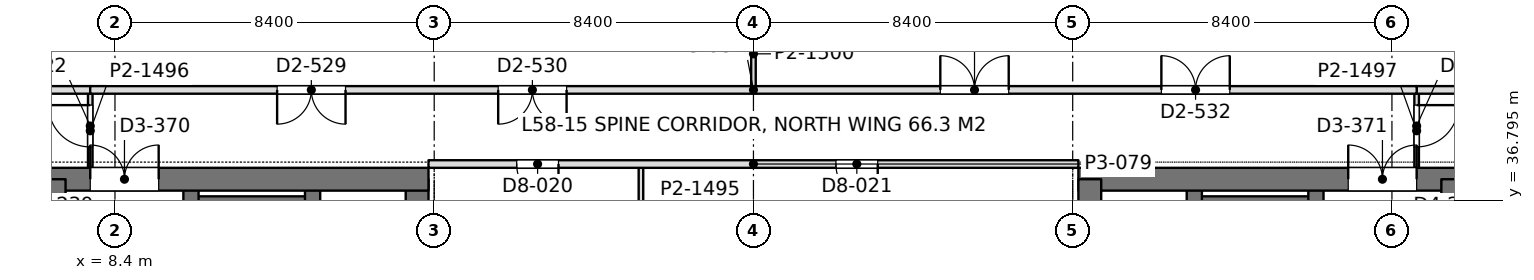
"""IFC4 building model, lengths in metres.
Left out: names, types, materials, properties, quantities, classifications, styles, units other than length and angle.
Written with IfcOpenShell. Run it as: python <this file> out.ifc"""

import sys

from ifc_helpers import new_model, si_unit, direction, frame, frame_2d, origin, place, context, subcontext, project, spatial, rectangle, extrude, element, fill, save


model = new_model("IFC4")
c1 = context("Model", 3, precision=1e-05, world=origin(), true_north=direction((0.0, 1.0)))
c2 = subcontext(c1, "Body", "Model", "MODEL_VIEW")
j1 = project(units=[si_unit("LENGTHUNIT", "METRE"), si_unit("PLANEANGLEUNIT", "RADIAN")], contexts=[c1])
p1 = place(None, origin())
s1 = spatial("IfcSite", under=j1, at=p1, CompositionType="ELEMENT")
p2 = place(p1, origin())
s2 = spatial("IfcBuilding", under=s1, at=p2, CompositionType="ELEMENT")
p3 = place(p2, frame((0.0, 0.0, 254.7)))
s3 = spatial("IfcBuildingStorey", under=s2, at=p3, CompositionType="ELEMENT", Elevation=254.7)
p4 = place(p3, frame((-1.05, 37.35, 0.0), z_axis=(0.0, 0.0, 1.0), x_axis=(1.0, 0.0, 0.0)))
e1 = element("IfcWall", 1, at=p4, inside=s3, PredefinedType="SHEAR", context=c2, shape_type="SweptSolid", body=[
    extrude(rectangle(XDim=17.7, YDim=0.6, at=frame_2d((8.85, 0.0))), origin(), (0.0, 0.0, 1.0), 4.5),
])
p5 = place(p4, frame((8.8, 0.0, 0.0)))
e2 = element("IfcOpeningElement", 2, at=p5, cuts=e1, PredefinedType="OPENING", context=c2, shape_type="SweptSolid", body=[
    extrude(rectangle(XDim=1.8, YDim=2.4, at=frame_2d((0.9, 1.2))), frame((0.0, 0.31, 0.0), z_axis=(0.0, -1.0, 0.0), x_axis=(1.0, 0.0, 0.0)), (0.0, 0.0, 1.0), 0.62),
])
p6 = place(p3, frame((16.35, 27.8, 0.0), z_axis=(0.0, 0.0, 1.0), x_axis=(0.0, 1.0, 0.0)))
e3 = element("IfcWall", 3, at=p6, inside=s3, PredefinedType="SHEAR", context=c2, shape_type="SweptSolid", body=[
    extrude(rectangle(XDim=9.55, YDim=0.6, at=frame_2d((4.775, 0.0))), origin(), (0.0, 0.0, 1.0), 4.5),
])
p7 = place(p3, frame((6.9, 13.05, 0.0), z_axis=(0.0, 0.0, 1.0), x_axis=(0.0, 1.0, 0.0)))
e4 = element("IfcWall", 4, at=p7, inside=s3, PredefinedType="SHEAR", context=c2, shape_type="SweptSolid", body=[
    extrude(rectangle(XDim=24.3, YDim=0.4, at=frame_2d((12.15, 0.0))), origin(), (0.0, 0.0, 1.0), 4.5),
])
p8 = place(p7, frame((1.3, 0.0, 0.0)))
e5 = element("IfcOpeningElement", 5, at=p8, cuts=e4, PredefinedType="OPENING", context=c2, shape_type="SweptSolid", body=[
    extrude(rectangle(XDim=1.0, YDim=2.2, at=frame_2d((0.5, 1.1))), frame((0.0, 0.21, 0.0), z_axis=(0.0, -1.0, 0.0), x_axis=(1.0, 0.0, 0.0)), (0.0, 0.0, 1.0), 0.42),
])
p9 = place(p7, frame((22.0, 0.0, 0.0)))
e6 = element("IfcOpeningElement", 6, at=p9, cuts=e4, PredefinedType="OPENING", context=c2, shape_type="SweptSolid", body=[
    extrude(rectangle(XDim=1.0, YDim=2.2, at=frame_2d((0.5, 1.1))), frame((0.0, 0.21, 0.0), z_axis=(0.0, -1.0, 0.0), x_axis=(1.0, 0.0, 0.0)), (0.0, 0.0, 1.0), 0.42),
])
p10 = place(p7, frame((5.55, 0.0, 0.0)))
e7 = element("IfcOpeningElement", 7, at=p10, cuts=e4, PredefinedType="OPENING", context=c2, shape_type="SweptSolid", body=[
    extrude(rectangle(XDim=1.0, YDim=2.2, at=frame_2d((0.5, 1.1))), frame((0.0, 0.21, 0.0), z_axis=(0.0, -1.0, 0.0), x_axis=(1.0, 0.0, 0.0)), (0.0, 0.0, 1.0), 0.42),
])
p11 = place(p7, frame((9.55, 0.0, 0.0)))
e8 = element("IfcOpeningElement", 8, at=p11, cuts=e4, PredefinedType="OPENING", context=c2, shape_type="SweptSolid", body=[
    extrude(rectangle(XDim=1.0, YDim=2.2, at=frame_2d((0.5, 1.1))), frame((0.0, 0.21, 0.0), z_axis=(0.0, -1.0, 0.0), x_axis=(1.0, 0.0, 0.0)), (0.0, 0.0, 1.0), 0.42),
])
p12 = place(p7, frame((12.8, 0.0, 0.0)))
e9 = element("IfcOpeningElement", 9, at=p12, cuts=e4, PredefinedType="OPENING", context=c2, shape_type="SweptSolid", body=[
    extrude(rectangle(XDim=1.1, YDim=2.2, at=frame_2d((0.55, 1.1))), frame((0.0, 0.21, 0.0), z_axis=(0.0, -1.0, 0.0), x_axis=(1.0, 0.0, 0.0)), (0.0, 0.0, 1.0), 0.42),
])
p13 = place(p7, frame((15.538, 0.0, 0.0)))
e10 = element("IfcOpeningElement", 10, at=p13, cuts=e4, PredefinedType="OPENING", context=c2, shape_type="SweptSolid", body=[
    extrude(rectangle(XDim=1.1, YDim=2.2, at=frame_2d((0.55, 1.1))), frame((0.0, 0.21, 0.0), z_axis=(0.0, -1.0, 0.0), x_axis=(1.0, 0.0, 0.0)), (0.0, 0.0, 1.0), 0.42),
])
p14 = place(p7, frame((18.262, 0.0, 0.0)))
e11 = element("IfcOpeningElement", 11, at=p14, cuts=e4, PredefinedType="OPENING", context=c2, shape_type="SweptSolid", body=[
    extrude(rectangle(XDim=1.1, YDim=2.2, at=frame_2d((0.55, 1.1))), frame((0.0, 0.21, 0.0), z_axis=(0.0, -1.0, 0.0), x_axis=(1.0, 0.0, 0.0)), (0.0, 0.0, 1.0), 0.42),
])
p15 = place(p3, frame((10.4, 13.05, 0.0), z_axis=(0.0, 0.0, 1.0), x_axis=(0.0, 1.0, 0.0)))
e12 = element("IfcWall", 12, at=p15, inside=s3, PredefinedType="SHEAR", context=c2, shape_type="SweptSolid", body=[
    extrude(rectangle(XDim=24.3, YDim=0.4, at=frame_2d((12.15, 0.0))), origin(), (0.0, 0.0, 1.0), 4.5),
])
p16 = place(p15, frame((15.75, 0.0, 0.0)))
e13 = element("IfcOpeningElement", 13, at=p16, cuts=e12, PredefinedType="OPENING", context=c2, shape_type="SweptSolid", body=[
    extrude(rectangle(XDim=1.1, YDim=2.2, at=frame_2d((0.55, 1.1))), frame((0.0, 0.21, 0.0), z_axis=(0.0, -1.0, 0.0), x_axis=(1.0, 0.0, 0.0)), (0.0, 0.0, 1.0), 0.42),
])
p17 = place(p15, frame((18.6, 0.0, 0.0)))
e14 = element("IfcOpeningElement", 14, at=p17, cuts=e12, PredefinedType="OPENING", context=c2, shape_type="SweptSolid", body=[
    extrude(rectangle(XDim=1.1, YDim=2.2, at=frame_2d((0.55, 1.1))), frame((0.0, 0.21, 0.0), z_axis=(0.0, -1.0, 0.0), x_axis=(1.0, 0.0, 0.0)), (0.0, 0.0, 1.0), 0.42),
])
p18 = place(p15, frame((21.45, 0.0, 0.0)))
e15 = element("IfcOpeningElement", 15, at=p18, cuts=e12, PredefinedType="OPENING", context=c2, shape_type="SweptSolid", body=[
    extrude(rectangle(XDim=1.1, YDim=2.2, at=frame_2d((0.55, 1.1))), frame((0.0, 0.21, 0.0), z_axis=(0.0, -1.0, 0.0), x_axis=(1.0, 0.0, 0.0)), (0.0, 0.0, 1.0), 0.42),
])
p19 = place(p15, frame((8.65, 0.0, 0.0)))
e16 = element("IfcOpeningElement", 16, at=p19, cuts=e12, PredefinedType="OPENING", context=c2, shape_type="SweptSolid", body=[
    extrude(rectangle(XDim=1.8, YDim=2.4, at=frame_2d((0.9, 1.2))), frame((0.0, 0.21, 0.0), z_axis=(0.0, -1.0, 0.0), x_axis=(1.0, 0.0, 0.0)), (0.0, 0.0, 1.0), 0.42),
])
p20 = place(p3, frame((13.6, 27.925, 0.0), z_axis=(0.0, 0.0, 1.0), x_axis=(0.0, 1.0, 0.0)))
e17 = element("IfcWall", 17, at=p20, inside=s3, PredefinedType="SHEAR", context=c2, shape_type="SweptSolid", body=[
    extrude(rectangle(XDim=9.425, YDim=0.4, at=frame_2d((4.712, 0.0))), origin(), (0.0, 0.0, 1.0), 4.5),
])
p21 = place(p3, frame((10.4, 36.625, 0.0), z_axis=(0.0, 0.0, 1.0), x_axis=(1.0, 0.0, 0.0)))
e18 = element("IfcWall", 18, at=p21, inside=s3, PredefinedType="SHEAR", context=c2, shape_type="SweptSolid", body=[
    extrude(rectangle(XDim=3.2, YDim=0.55, at=frame_2d((1.6, 0.0))), origin(), (0.0, 0.0, 1.0), 4.5),
])
p22 = place(p3, frame((33.75, 37.35, 0.0), z_axis=(0.0, 0.0, 1.0), x_axis=(1.0, 0.0, 0.0)))
e19 = element("IfcWall", 19, at=p22, inside=s3, PredefinedType="SHEAR", context=c2, shape_type="SweptSolid", body=[
    extrude(rectangle(XDim=17.7, YDim=0.6, at=frame_2d((8.85, 0.0))), origin(), (0.0, 0.0, 1.0), 4.5),
])
p23 = place(p22, frame((7.1, 0.0, 0.0)))
e20 = element("IfcOpeningElement", 20, at=p23, cuts=e19, PredefinedType="OPENING", context=c2, shape_type="SweptSolid", body=[
    extrude(rectangle(XDim=1.8, YDim=2.4, at=frame_2d((0.9, 1.2))), frame((0.0, 0.31, 0.0), z_axis=(0.0, -1.0, 0.0), x_axis=(1.0, 0.0, 0.0)), (0.0, 0.0, 1.0), 0.62),
])
p24 = place(p3, frame((34.05, 27.8, 0.0), z_axis=(0.0, 0.0, 1.0), x_axis=(0.0, 1.0, 0.0)))
e21 = element("IfcWall", 21, at=p24, inside=s3, PredefinedType="SHEAR", context=c2, shape_type="SweptSolid", body=[
    extrude(rectangle(XDim=9.55, YDim=0.6, at=frame_2d((4.775, 0.0))), origin(), (0.0, 0.0, 1.0), 4.5),
])
p25 = place(p3, frame((43.5, 13.05, 0.0), z_axis=(0.0, 0.0, 1.0), x_axis=(0.0, 1.0, 0.0)))
e22 = element("IfcWall", 22, at=p25, inside=s3, PredefinedType="SHEAR", context=c2, shape_type="SweptSolid", body=[
    extrude(rectangle(XDim=24.3, YDim=0.4, at=frame_2d((12.15, 0.0))), origin(), (0.0, 0.0, 1.0), 4.5),
])
p26 = place(p25, frame((1.3, 0.0, 0.0)))
e23 = element("IfcOpeningElement", 23, at=p26, cuts=e22, PredefinedType="OPENING", context=c2, shape_type="SweptSolid", body=[
    extrude(rectangle(XDim=1.0, YDim=2.2, at=frame_2d((0.5, 1.1))), frame((0.0, 0.21, 0.0), z_axis=(0.0, -1.0, 0.0), x_axis=(1.0, 0.0, 0.0)), (0.0, 0.0, 1.0), 0.42),
])
p27 = place(p25, frame((22.0, 0.0, 0.0)))
e24 = element("IfcOpeningElement", 24, at=p27, cuts=e22, PredefinedType="OPENING", context=c2, shape_type="SweptSolid", body=[
    extrude(rectangle(XDim=1.0, YDim=2.2, at=frame_2d((0.5, 1.1))), frame((0.0, 0.21, 0.0), z_axis=(0.0, -1.0, 0.0), x_axis=(1.0, 0.0, 0.0)), (0.0, 0.0, 1.0), 0.42),
])
p28 = place(p25, frame((5.55, 0.0, 0.0)))
e25 = element("IfcOpeningElement", 25, at=p28, cuts=e22, PredefinedType="OPENING", context=c2, shape_type="SweptSolid", body=[
    extrude(rectangle(XDim=1.0, YDim=2.2, at=frame_2d((0.5, 1.1))), frame((0.0, 0.21, 0.0), z_axis=(0.0, -1.0, 0.0), x_axis=(1.0, 0.0, 0.0)), (0.0, 0.0, 1.0), 0.42),
])
p29 = place(p25, frame((9.55, 0.0, 0.0)))
e26 = element("IfcOpeningElement", 26, at=p29, cuts=e22, PredefinedType="OPENING", context=c2, shape_type="SweptSolid", body=[
    extrude(rectangle(XDim=1.0, YDim=2.2, at=frame_2d((0.5, 1.1))), frame((0.0, 0.21, 0.0), z_axis=(0.0, -1.0, 0.0), x_axis=(1.0, 0.0, 0.0)), (0.0, 0.0, 1.0), 0.42),
])
p30 = place(p25, frame((12.8, 0.0, 0.0)))
e27 = element("IfcOpeningElement", 27, at=p30, cuts=e22, PredefinedType="OPENING", context=c2, shape_type="SweptSolid", body=[
    extrude(rectangle(XDim=1.1, YDim=2.2, at=frame_2d((0.55, 1.1))), frame((0.0, 0.21, 0.0), z_axis=(0.0, -1.0, 0.0), x_axis=(1.0, 0.0, 0.0)), (0.0, 0.0, 1.0), 0.42),
])
p31 = place(p25, frame((15.538, 0.0, 0.0)))
e28 = element("IfcOpeningElement", 28, at=p31, cuts=e22, PredefinedType="OPENING", context=c2, shape_type="SweptSolid", body=[
    extrude(rectangle(XDim=1.1, YDim=2.2, at=frame_2d((0.55, 1.1))), frame((0.0, 0.21, 0.0), z_axis=(0.0, -1.0, 0.0), x_axis=(1.0, 0.0, 0.0)), (0.0, 0.0, 1.0), 0.42),
])
p32 = place(p25, frame((18.262, 0.0, 0.0)))
e29 = element("IfcOpeningElement", 29, at=p32, cuts=e22, PredefinedType="OPENING", context=c2, shape_type="SweptSolid", body=[
    extrude(rectangle(XDim=1.1, YDim=2.2, at=frame_2d((0.55, 1.1))), frame((0.0, 0.21, 0.0), z_axis=(0.0, -1.0, 0.0), x_axis=(1.0, 0.0, 0.0)), (0.0, 0.0, 1.0), 0.42),
])
p33 = place(p3, frame((40.0, 13.05, 0.0), z_axis=(0.0, 0.0, 1.0), x_axis=(0.0, 1.0, 0.0)))
e30 = element("IfcWall", 30, at=p33, inside=s3, PredefinedType="SHEAR", context=c2, shape_type="SweptSolid", body=[
    extrude(rectangle(XDim=24.3, YDim=0.4, at=frame_2d((12.15, 0.0))), origin(), (0.0, 0.0, 1.0), 4.5),
])
p34 = place(p33, frame((15.75, 0.0, 0.0)))
e31 = element("IfcOpeningElement", 31, at=p34, cuts=e30, PredefinedType="OPENING", context=c2, shape_type="SweptSolid", body=[
    extrude(rectangle(XDim=1.1, YDim=2.2, at=frame_2d((0.55, 1.1))), frame((0.0, 0.21, 0.0), z_axis=(0.0, -1.0, 0.0), x_axis=(1.0, 0.0, 0.0)), (0.0, 0.0, 1.0), 0.42),
])
p35 = place(p33, frame((18.6, 0.0, 0.0)))
e32 = element("IfcOpeningElement", 32, at=p35, cuts=e30, PredefinedType="OPENING", context=c2, shape_type="SweptSolid", body=[
    extrude(rectangle(XDim=1.1, YDim=2.2, at=frame_2d((0.55, 1.1))), frame((0.0, 0.21, 0.0), z_axis=(0.0, -1.0, 0.0), x_axis=(1.0, 0.0, 0.0)), (0.0, 0.0, 1.0), 0.42),
])
p36 = place(p33, frame((21.45, 0.0, 0.0)))
e33 = element("IfcOpeningElement", 33, at=p36, cuts=e30, PredefinedType="OPENING", context=c2, shape_type="SweptSolid", body=[
    extrude(rectangle(XDim=1.1, YDim=2.2, at=frame_2d((0.55, 1.1))), frame((0.0, 0.21, 0.0), z_axis=(0.0, -1.0, 0.0), x_axis=(1.0, 0.0, 0.0)), (0.0, 0.0, 1.0), 0.42),
])
p37 = place(p33, frame((8.65, 0.0, 0.0)))
e34 = element("IfcOpeningElement", 34, at=p37, cuts=e30, PredefinedType="OPENING", context=c2, shape_type="SweptSolid", body=[
    extrude(rectangle(XDim=1.8, YDim=2.4, at=frame_2d((0.9, 1.2))), frame((0.0, 0.21, 0.0), z_axis=(0.0, -1.0, 0.0), x_axis=(1.0, 0.0, 0.0)), (0.0, 0.0, 1.0), 0.42),
])
p38 = place(p33, frame((1.5, 0.0, 0.0)))
e35 = element("IfcOpeningElement", 35, at=p38, cuts=e30, PredefinedType="OPENING", context=c2, shape_type="SweptSolid", body=[
    extrude(rectangle(XDim=1.8, YDim=2.4, at=frame_2d((0.9, 1.2))), frame((0.0, 0.21, 0.0), z_axis=(0.0, -1.0, 0.0), x_axis=(1.0, 0.0, 0.0)), (0.0, 0.0, 1.0), 0.42),
])
p39 = place(p3, frame((36.8, 27.925, 0.0), z_axis=(0.0, 0.0, 1.0), x_axis=(0.0, 1.0, 0.0)))
e36 = element("IfcWall", 36, at=p39, inside=s3, PredefinedType="SHEAR", context=c2, shape_type="SweptSolid", body=[
    extrude(rectangle(XDim=9.425, YDim=0.4, at=frame_2d((4.712, 0.0))), origin(), (0.0, 0.0, 1.0), 4.5),
])
p40 = place(p3, frame((40.0, 36.625, 0.0), z_axis=(0.0, 0.0, 1.0), x_axis=(-1.0, 0.0, 0.0)))
e37 = element("IfcWall", 37, at=p40, inside=s3, PredefinedType="SHEAR", context=c2, shape_type="SweptSolid", body=[
    extrude(rectangle(XDim=3.2, YDim=0.55, at=frame_2d((1.6, 0.0))), origin(), (0.0, 0.0, 1.0), 4.5),
])
p41 = place(p3, frame((25.2, 39.798, 0.0), z_axis=(0.0, 0.0, 1.0), x_axis=(0.0, 1.0, 0.0)))
e38 = element("IfcWall", 38, at=p41, inside=s3, PredefinedType="PARTITIONING", context=c2, shape_type="SweptSolid", body=[
    extrude(rectangle(XDim=1.703, YDim=0.12, at=frame_2d((0.852, 0.0))), origin(), (0.0, 0.0, 1.0), 3.8),
])
p42 = place(p3, frame((7.748, 39.7, 0.0), z_axis=(0.0, 0.0, 1.0), x_axis=(1.0, 0.0, 0.0)))
e39 = element("IfcWall", 39, at=p42, inside=s3, PredefinedType="PARTITIONING", context=c2, shape_type="SweptSolid", body=[
    extrude(rectangle(XDim=34.904, YDim=0.2, at=frame_2d((17.452, 0.0))), origin(), (0.0, 0.0, 1.0), 3.8),
])
p43 = place(p42, frame((4.919, 0.0, 0.0)))
e40 = element("IfcOpeningElement", 40, at=p43, cuts=e39, PredefinedType="OPENING", context=c2, shape_type="SweptSolid", body=[
    extrude(rectangle(XDim=1.8, YDim=2.2, at=frame_2d((0.9, 1.1))), frame((0.0, 0.11, 0.0), z_axis=(0.0, -1.0, 0.0), x_axis=(1.0, 0.0, 0.0)), (0.0, 0.0, 1.0), 0.22),
])
p44 = place(p42, frame((10.735, 0.0, 0.0)))
e41 = element("IfcOpeningElement", 41, at=p44, cuts=e39, PredefinedType="OPENING", context=c2, shape_type="SweptSolid", body=[
    extrude(rectangle(XDim=1.8, YDim=2.2, at=frame_2d((0.9, 1.1))), frame((0.0, 0.11, 0.0), z_axis=(0.0, -1.0, 0.0), x_axis=(1.0, 0.0, 0.0)), (0.0, 0.0, 1.0), 0.22),
])
p45 = place(p42, frame((22.369, 0.0, 0.0)))
e42 = element("IfcOpeningElement", 42, at=p45, cuts=e39, PredefinedType="OPENING", context=c2, shape_type="SweptSolid", body=[
    extrude(rectangle(XDim=1.8, YDim=2.2, at=frame_2d((0.9, 1.1))), frame((0.0, 0.11, 0.0), z_axis=(0.0, -1.0, 0.0), x_axis=(1.0, 0.0, 0.0)), (0.0, 0.0, 1.0), 0.22),
])
p46 = place(p42, frame((28.185, 0.0, 0.0)))
e43 = element("IfcOpeningElement", 43, at=p46, cuts=e39, PredefinedType="OPENING", context=c2, shape_type="SweptSolid", body=[
    extrude(rectangle(XDim=1.8, YDim=2.2, at=frame_2d((0.9, 1.1))), frame((0.0, 0.11, 0.0), z_axis=(0.0, -1.0, 0.0), x_axis=(1.0, 0.0, 0.0)), (0.0, 0.0, 1.0), 0.22),
])
p47 = place(p3, frame((7.75, 37.648, 0.0), z_axis=(0.0, 0.0, 1.0), x_axis=(0.0, 1.0, 0.0)))
e44 = element("IfcWall", 44, at=p47, inside=s3, PredefinedType="PARTITIONING", context=c2, shape_type="SweptSolid", body=[
    extrude(rectangle(XDim=1.954, YDim=0.12, at=frame_2d((0.977, 0.0))), origin(), (0.0, 0.0, 1.0), 4.35),
])
p48 = place(p47, frame((0.552, 0.0, 0.0)))
e45 = element("IfcOpeningElement", 45, at=p48, cuts=e44, PredefinedType="OPENING", context=c2, shape_type="SweptSolid", body=[
    extrude(rectangle(XDim=1.1, YDim=2.4, at=frame_2d((0.55, 1.2))), frame((0.0, 0.07, 0.0), z_axis=(0.0, -1.0, 0.0), x_axis=(1.0, 0.0, 0.0)), (0.0, 0.0, 1.0), 0.14),
])
p49 = place(p3, frame((42.65, 37.648, 0.0), z_axis=(0.0, 0.0, 1.0), x_axis=(0.0, 1.0, 0.0)))
e46 = element("IfcWall", 46, at=p49, inside=s3, PredefinedType="PARTITIONING", context=c2, shape_type="SweptSolid", body=[
    extrude(rectangle(XDim=1.954, YDim=0.12, at=frame_2d((0.977, 0.0))), origin(), (0.0, 0.0, 1.0), 4.35),
])
p50 = place(p49, frame((0.552, 0.0, 0.0)))
e47 = element("IfcOpeningElement", 47, at=p50, cuts=e46, PredefinedType="OPENING", context=c2, shape_type="SweptSolid", body=[
    extrude(rectangle(XDim=1.1, YDim=2.4, at=frame_2d((0.55, 1.2))), frame((0.0, 0.07, 0.0), z_axis=(0.0, -1.0, 0.0), x_axis=(1.0, 0.0, 0.0)), (0.0, 0.0, 1.0), 0.14),
])
for number, where, z_axis, x_axis in (
    (48, (1.2, 39.7, 0.0), (0.0, 0.0, 1.0), (1.0, 0.0, 0.0)),
    (49, (42.648, 39.7, 0.0), (0.0, 0.0, 1.0), (1.0, 0.0, 0.0)),
):
    element("IfcWall", number, at=place(p3, frame(where, z_axis=z_axis, x_axis=x_axis)), inside=s3, PredefinedType="PARTITIONING", context=c2, shape_type="SweptSolid", body=[
        extrude(rectangle(XDim=6.552, YDim=0.2, at=frame_2d((3.276, 0.0))), origin(), (0.0, 0.0, 1.0), 3.99),
    ])
p51 = place(p3, frame((22.24, 33.298, 0.0), z_axis=(0.0, 0.0, 1.0), x_axis=(0.0, 1.0, 0.0)))
e50 = element("IfcWall", 50, at=p51, inside=s3, PredefinedType="PARTITIONING", context=c2, shape_type="SweptSolid", body=[
    extrude(rectangle(XDim=4.404, YDim=0.12, at=frame_2d((2.202, 0.0))), origin(), (0.0, 0.0, 1.0), 3.66),
])
p52 = place(p3, frame((16.65, 37.75, 0.0), z_axis=(0.0, 0.0, 1.0), x_axis=(1.0, 0.0, 0.0)))
e51 = element("IfcWall", 51, at=p52, inside=s3, PredefinedType="PARTITIONING", context=c2, shape_type="SweptSolid", body=[
    extrude(rectangle(XDim=17.1, YDim=0.2, at=frame_2d((8.55, 0.0))), origin(), (0.0, 0.0, 1.0), 3.8),
])
p53 = place(p52, frame((2.32, 0.0, 0.0)))
e52 = element("IfcOpeningElement", 52, at=p53, cuts=e51, PredefinedType="OPENING", context=c2, shape_type="SweptSolid", body=[
    extrude(rectangle(XDim=1.1, YDim=2.4, at=frame_2d((0.55, 1.2))), frame((0.0, 0.11, 0.0), z_axis=(0.0, -1.0, 0.0), x_axis=(1.0, 0.0, 0.0)), (0.0, 0.0, 1.0), 0.22),
])
p54 = place(p52, frame((10.72, 0.0, 0.0)))
e53 = element("IfcOpeningElement", 53, at=p54, cuts=e51, PredefinedType="OPENING", context=c2, shape_type="SweptSolid", body=[
    extrude(rectangle(XDim=1.1, YDim=2.4, at=frame_2d((0.55, 1.2))), frame((0.0, 0.11, 0.0), z_axis=(0.0, -1.0, 0.0), x_axis=(1.0, 0.0, 0.0)), (0.0, 0.0, 1.0), 0.22),
])
p55 = place(p5, origin())
e54 = element("IfcDoor", 54, at=p55, inside=s3, OperationType="DOUBLE_DOOR_SINGLE_SWING", PredefinedType="DOOR", context=c2, shape_type="SweptSolid", body=[
    extrude(rectangle(XDim=1.8, YDim=2.4, at=frame_2d((0.9, 1.2))), frame((0.0, 0.025, 0.0), z_axis=(0.0, -1.0, 0.0), x_axis=(1.0, 0.0, 0.0)), (0.0, 0.0, 1.0), 0.05),
])
fill(e2, e54)
p56 = place(p23, origin())
e55 = element("IfcDoor", 55, at=p56, inside=s3, OperationType="DOUBLE_DOOR_SINGLE_SWING", PredefinedType="DOOR", context=c2, shape_type="SweptSolid", body=[
    extrude(rectangle(XDim=1.8, YDim=2.4, at=frame_2d((0.9, 1.2))), frame((0.0, 0.025, 0.0), z_axis=(0.0, -1.0, 0.0), x_axis=(1.0, 0.0, 0.0)), (0.0, 0.0, 1.0), 0.05),
])
fill(e20, e55)
p57 = place(p43, frame((1.8, 0.0, 0.0), z_axis=(0.0, 0.0, 1.0), x_axis=(-1.0, 0.0, 0.0)))
e56 = element("IfcDoor", 56, at=p57, inside=s3, OperationType="DOUBLE_DOOR_SINGLE_SWING", PredefinedType="DOOR", context=c2, shape_type="SweptSolid", body=[
    extrude(rectangle(XDim=1.8, YDim=2.2, at=frame_2d((0.9, 1.1))), frame((0.0, 0.025, 0.0), z_axis=(0.0, -1.0, 0.0), x_axis=(1.0, 0.0, 0.0)), (0.0, 0.0, 1.0), 0.05),
])
fill(e40, e56)
p58 = place(p44, frame((1.8, 0.0, 0.0), z_axis=(0.0, 0.0, 1.0), x_axis=(-1.0, 0.0, 0.0)))
e57 = element("IfcDoor", 57, at=p58, inside=s3, OperationType="DOUBLE_DOOR_SINGLE_SWING", PredefinedType="DOOR", context=c2, shape_type="SweptSolid", body=[
    extrude(rectangle(XDim=1.8, YDim=2.2, at=frame_2d((0.9, 1.1))), frame((0.0, 0.025, 0.0), z_axis=(0.0, -1.0, 0.0), x_axis=(1.0, 0.0, 0.0)), (0.0, 0.0, 1.0), 0.05),
])
fill(e41, e57)
p59 = place(p45, origin())
e58 = element("IfcDoor", 58, at=p59, inside=s3, OperationType="DOUBLE_DOOR_SINGLE_SWING", PredefinedType="DOOR", context=c2, shape_type="SweptSolid", body=[
    extrude(rectangle(XDim=1.8, YDim=2.2, at=frame_2d((0.9, 1.1))), frame((0.0, 0.025, 0.0), z_axis=(0.0, -1.0, 0.0), x_axis=(1.0, 0.0, 0.0)), (0.0, 0.0, 1.0), 0.05),
])
fill(e42, e58)
p60 = place(p46, origin())
e59 = element("IfcDoor", 59, at=p60, inside=s3, OperationType="DOUBLE_DOOR_SINGLE_SWING", PredefinedType="DOOR", context=c2, shape_type="SweptSolid", body=[
    extrude(rectangle(XDim=1.8, YDim=2.2, at=frame_2d((0.9, 1.1))), frame((0.0, 0.025, 0.0), z_axis=(0.0, -1.0, 0.0), x_axis=(1.0, 0.0, 0.0)), (0.0, 0.0, 1.0), 0.05),
])
fill(e43, e59)
p61 = place(p48, origin())
e60 = element("IfcDoor", 60, at=p61, inside=s3, OperationType="SINGLE_SWING_RIGHT", PredefinedType="DOOR", context=c2, shape_type="SweptSolid", body=[
    extrude(rectangle(XDim=1.1, YDim=2.4, at=frame_2d((0.55, 1.2))), frame((0.0, 0.025, 0.0), z_axis=(0.0, -1.0, 0.0), x_axis=(1.0, 0.0, 0.0)), (0.0, 0.0, 1.0), 0.05),
])
fill(e45, e60)
p62 = place(p50, frame((1.1, 0.0, 0.0), z_axis=(0.0, 0.0, 1.0), x_axis=(-1.0, 0.0, 0.0)))
e61 = element("IfcDoor", 61, at=p62, inside=s3, OperationType="SINGLE_SWING_LEFT", PredefinedType="DOOR", context=c2, shape_type="SweptSolid", body=[
    extrude(rectangle(XDim=1.1, YDim=2.4, at=frame_2d((0.55, 1.2))), frame((0.0, 0.025, 0.0), z_axis=(0.0, -1.0, 0.0), x_axis=(1.0, 0.0, 0.0)), (0.0, 0.0, 1.0), 0.05),
])
fill(e47, e61)
p63 = place(p53, frame((1.1, 0.0, 0.0), z_axis=(0.0, 0.0, 1.0), x_axis=(-1.0, 0.0, 0.0)))
e62 = element("IfcDoor", 62, at=p63, inside=s3, OperationType="SINGLE_SWING_LEFT", PredefinedType="DOOR", context=c2, shape_type="SweptSolid", body=[
    extrude(rectangle(XDim=1.1, YDim=2.4, at=frame_2d((0.55, 1.2))), frame((0.0, 0.025, 0.0), z_axis=(0.0, -1.0, 0.0), x_axis=(1.0, 0.0, 0.0)), (0.0, 0.0, 1.0), 0.05),
])
fill(e52, e62)
p64 = place(p54, frame((1.1, 0.0, 0.0), z_axis=(0.0, 0.0, 1.0), x_axis=(-1.0, 0.0, 0.0)))
e63 = element("IfcDoor", 63, at=p64, inside=s3, OperationType="SINGLE_SWING_LEFT", PredefinedType="DOOR", context=c2, shape_type="SweptSolid", body=[
    extrude(rectangle(XDim=1.1, YDim=2.4, at=frame_2d((0.55, 1.2))), frame((0.0, 0.025, 0.0), z_axis=(0.0, -1.0, 0.0), x_axis=(1.0, 0.0, 0.0)), (0.0, 0.0, 1.0), 0.05),
])
fill(e53, e63)
save(model, sys.argv[1])
